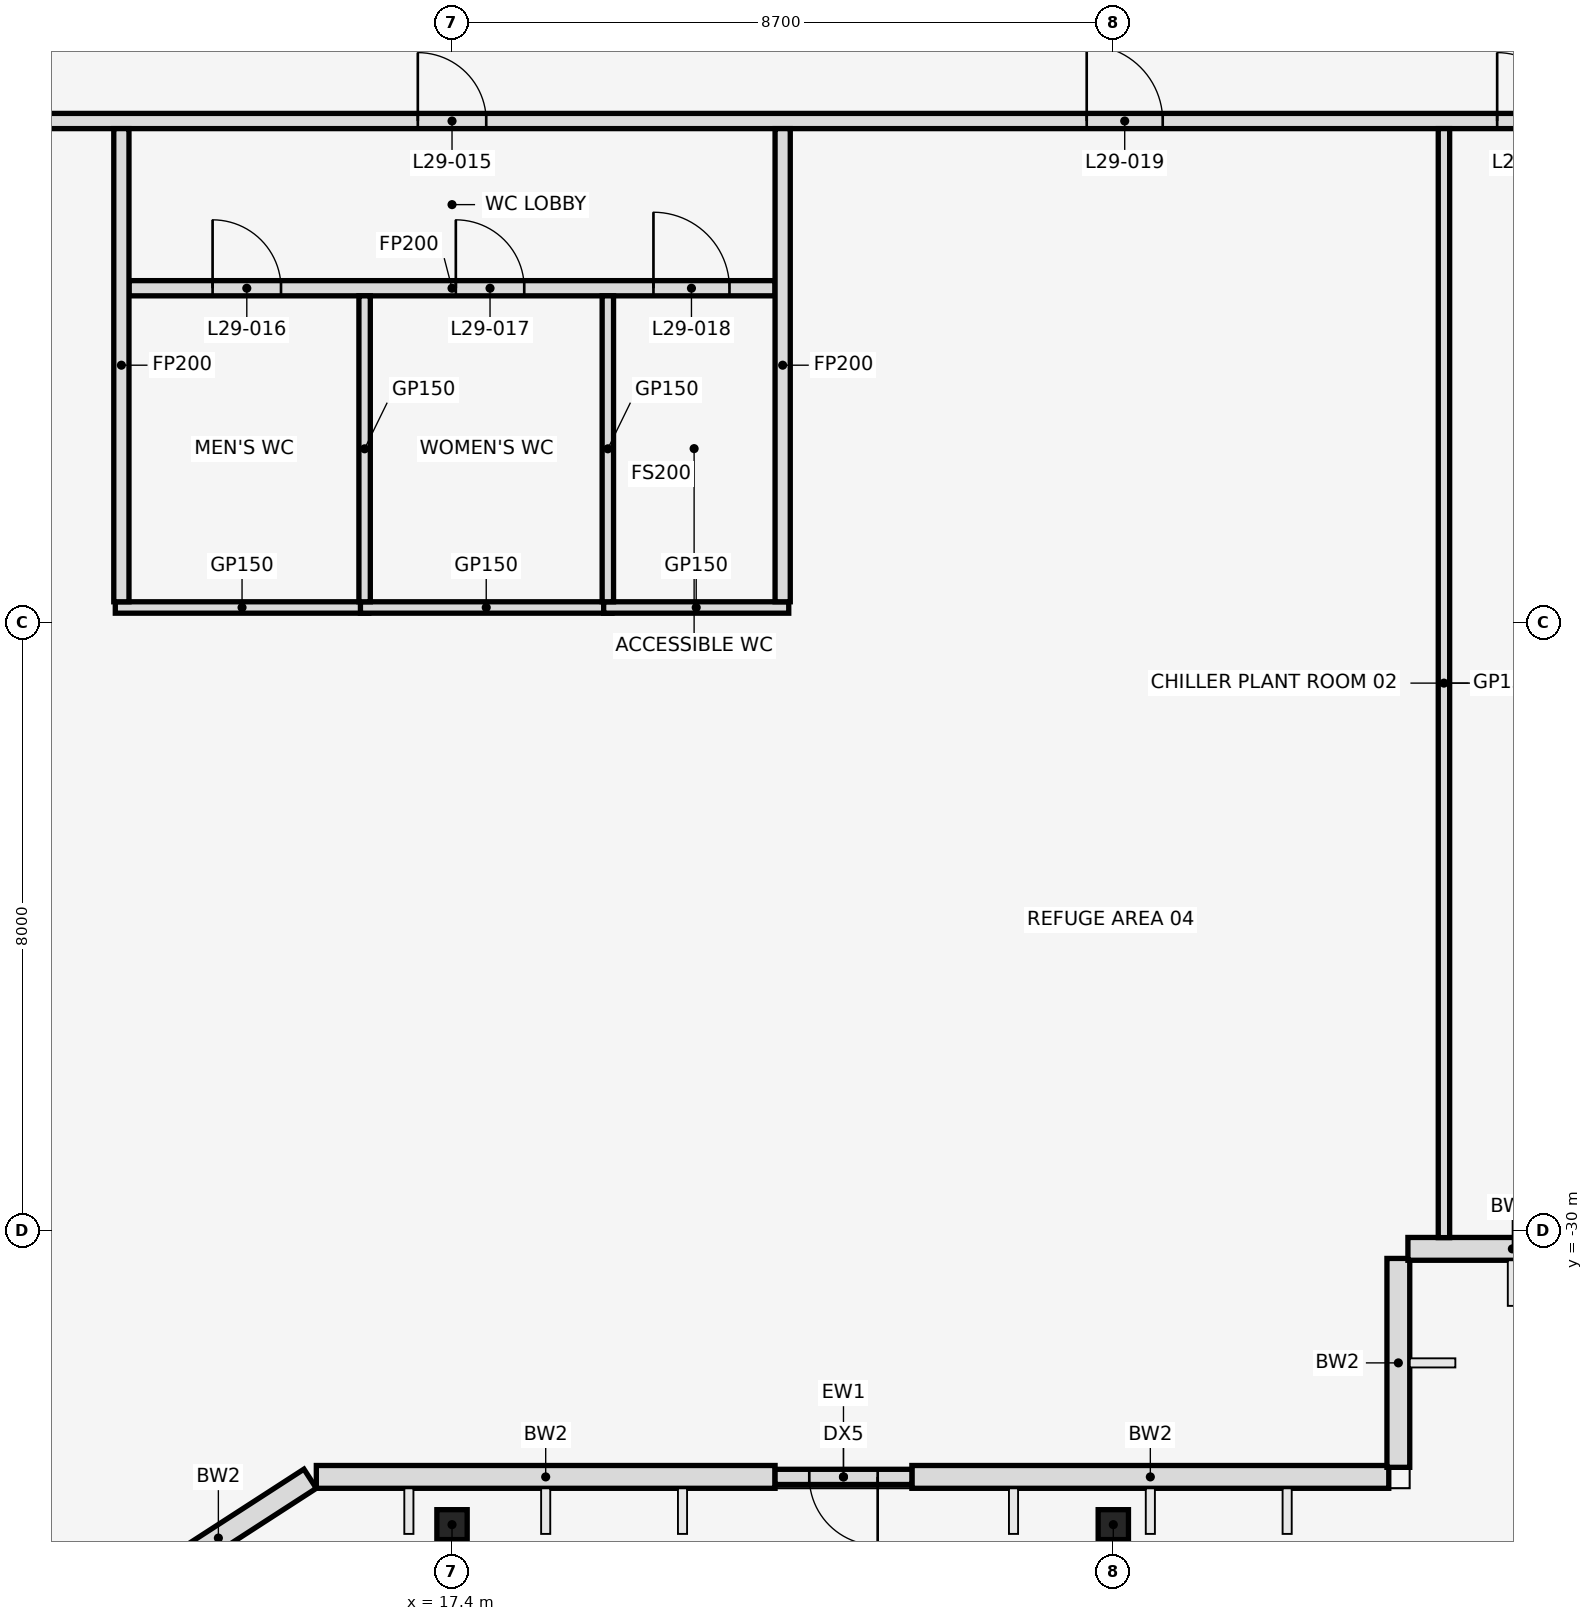
"""IFC4 building model, lengths in metres.
Left out: names, types, materials, properties, quantities, classifications, styles, units other than length and angle.
Written with IfcOpenShell. Run it as: python <this file> out.ifc"""

import sys

from ifc_helpers import new_model, si_unit, direction, frame, frame_2d, origin, origin_2d, place, context, subcontext, project, spatial, rectangle, i_section, extrude, element, fill, save


model = new_model("IFC4")
c1 = context("Model", 3, precision=1e-05, world=origin(), true_north=direction((0.0, 1.0)))
c2 = subcontext(c1, "Body", "Model", "MODEL_VIEW")
j1 = project(units=[si_unit("LENGTHUNIT", "METRE"), si_unit("PLANEANGLEUNIT", "RADIAN")], contexts=[c1])
p1 = place(None, origin())
s1 = spatial("IfcSite", under=j1, at=p1, CompositionType="ELEMENT")
p2 = place(p1, origin())
s2 = spatial("IfcBuilding", under=s1, at=p2, CompositionType="ELEMENT")
p3 = place(p2, frame((0.0, 0.0, 135.0)))
s3 = spatial("IfcBuildingStorey", under=s2, at=p3, CompositionType="ELEMENT", Elevation=135.0)
for number, where, z_axis, x_axis in (
    (1, (17.4, -33.866, 0.0), (0.0, 0.0, 1.0), (1.0, 0.0, 0.0)),
    (2, (26.1, -33.866, 0.0), (0.0, 0.0, 1.0), (1.0, 0.0, 0.0)),
):
    element("IfcColumn", number, at=place(p3, frame(where, z_axis=z_axis, x_axis=x_axis)), inside=s3, PredefinedType="COLUMN", context=c2, shape_type="SweptSolid", body=[
        extrude(i_section(OverallWidth=0.399, OverallDepth=0.394, WebThickness=0.023, FlangeThickness=0.037, at=origin_2d()), origin(), (0.0, 0.0, 1.0), 5.4),
    ])
p4 = place(p3, frame((13.119, -34.823, 0.0), z_axis=(0.0, 0.0, 1.0), x_axis=(0.839779682339, 0.542927329512, 0.0)))
e3 = element("IfcWall", 3, at=p4, inside=s3, PredefinedType="STANDARD", context=c2, shape_type="SweptSolid", body=[
    extrude(rectangle(XDim=2.875, YDim=0.3, at=frame_2d((1.438, 0.0))), origin(), (0.0, 0.0, 1.0), 4.26),
])
p5 = place(p3, frame((15.615, -33.238, 0.0), z_axis=(0.0, 0.0, 1.0), x_axis=(1.0, 0.0, 0.0)))
e4 = element("IfcWall", 4, at=p5, inside=s3, PredefinedType="STANDARD", context=c2, shape_type="SweptSolid", body=[
    extrude(rectangle(XDim=6.035, YDim=0.3, at=frame_2d((3.018, 0.0))), origin(), (0.0, 0.0, 1.0), 4.28),
])
p6 = place(p3, frame((23.45, -33.238, 0.0), z_axis=(0.0, 0.0, 1.0), x_axis=(1.0, 0.0, 0.0)))
e5 = element("IfcWall", 5, at=p6, inside=s3, PredefinedType="STANDARD", context=c2, shape_type="SweptSolid", body=[
    extrude(rectangle(XDim=6.274, YDim=0.3, at=frame_2d((3.137, 0.0))), origin(), (0.0, 0.0, 1.0), 4.28),
])
p7 = place(p3, frame((29.85, -33.112, 0.0), z_axis=(0.0, 0.0, 1.0), x_axis=(0.0, 1.0, 0.0)))
e6 = element("IfcWall", 6, at=p7, inside=s3, PredefinedType="STANDARD", context=c2, shape_type="SweptSolid", body=[
    extrude(rectangle(XDim=2.748, YDim=0.3, at=frame_2d((1.374, 0.0))), origin(), (0.0, 0.0, 1.0), 4.28),
])
p8 = place(p3, frame((29.976, -30.238, 0.0), z_axis=(0.0, 0.0, 1.0), x_axis=(1.0, 0.0, 0.0)))
e7 = element("IfcWall", 7, at=p8, inside=s3, PredefinedType="STANDARD", context=c2, shape_type="SweptSolid", body=[
    extrude(rectangle(XDim=2.748, YDim=0.3, at=frame_2d((1.374, 0.0))), origin(), (0.0, 0.0, 1.0), 4.28),
])
p9 = place(p3, frame((23.45, -33.238, 0.0), z_axis=(0.0, 0.0, 1.0), x_axis=(-1.0, 0.0, 0.0)))
e8 = element("IfcWall", 8, at=p9, inside=s3, PredefinedType="STANDARD", context=c2, shape_type="SweptSolid", body=[
    extrude(rectangle(XDim=1.8, YDim=0.2, at=frame_2d((0.9, 0.0))), origin(), (0.0, 0.0, 1.0), 5.25),
])
p10 = place(p9, frame((0.45, 0.0, 0.0)))
e9 = element("IfcOpeningElement", 9, at=p10, cuts=e8, PredefinedType="OPENING", context=c2, shape_type="SweptSolid", body=[
    extrude(rectangle(XDim=0.9, YDim=2.1, at=frame_2d((0.45, 1.05))), frame((0.0, 0.112, 0.0), z_axis=(0.0, -1.0, 0.0), x_axis=(1.0, 0.0, 0.0)), (0.0, 0.0, 1.0), 0.224),
])
p11 = place(p3, frame((12.97, -21.8, 0.0), z_axis=(0.0, 0.0, 1.0), x_axis=(1.0, 0.0, 0.0)))
e10 = element("IfcWall", 10, at=p11, inside=s3, PredefinedType="PARTITIONING", context=c2, shape_type="SweptSolid", body=[
    extrude(rectangle(XDim=3.335, YDim=0.15, at=frame_2d((1.667, 0.0))), origin(), (0.0, 0.0, 1.0), 4.24),
])
p12 = place(p3, frame((16.195, -21.8, 0.0), z_axis=(0.0, 0.0, 1.0), x_axis=(1.0, 0.0, 0.0)))
e11 = element("IfcWall", 11, at=p12, inside=s3, PredefinedType="PARTITIONING", context=c2, shape_type="SweptSolid", body=[
    extrude(rectangle(XDim=3.31, YDim=0.15, at=frame_2d((1.655, 0.0))), origin(), (0.0, 0.0, 1.0), 4.24),
])
p13 = place(p3, frame((19.395, -21.8, 0.0), z_axis=(0.0, 0.0, 1.0), x_axis=(1.0, 0.0, 0.0)))
e12 = element("IfcWall", 12, at=p13, inside=s3, PredefinedType="PARTITIONING", context=c2, shape_type="SweptSolid", body=[
    extrude(rectangle(XDim=2.435, YDim=0.15, at=frame_2d((1.218, 0.0))), origin(), (0.0, 0.0, 1.0), 4.24),
])
p14 = place(p3, frame((13.15, -17.6, 0.0), z_axis=(0.0, 0.0, 1.0), x_axis=(1.0, 0.0, 0.0)))
e13 = element("IfcWall", 13, at=p14, inside=s3, PredefinedType="PARTITIONING", context=c2, shape_type="SweptSolid", body=[
    extrude(rectangle(XDim=8.5, YDim=0.2, at=frame_2d((4.25, 0.0))), origin(), (0.0, 0.0, 1.0), 4.24),
])
p15 = place(p14, frame((1.1, 0.0, 0.0)))
e14 = element("IfcOpeningElement", 14, at=p15, cuts=e13, PredefinedType="OPENING", context=c2, shape_type="SweptSolid", body=[
    extrude(rectangle(XDim=0.9, YDim=2.1, at=frame_2d((0.45, 1.05))), frame((0.0, 0.112, 0.0), z_axis=(0.0, -1.0, 0.0), x_axis=(1.0, 0.0, 0.0)), (0.0, 0.0, 1.0), 0.224),
])
p16 = place(p14, frame((4.3, 0.0, 0.0)))
e15 = element("IfcOpeningElement", 15, at=p16, cuts=e13, PredefinedType="OPENING", context=c2, shape_type="SweptSolid", body=[
    extrude(rectangle(XDim=0.9, YDim=2.1, at=frame_2d((0.45, 1.05))), frame((0.0, 0.112, 0.0), z_axis=(0.0, -1.0, 0.0), x_axis=(1.0, 0.0, 0.0)), (0.0, 0.0, 1.0), 0.224),
])
p17 = place(p14, frame((6.9, 0.0, 0.0)))
e16 = element("IfcOpeningElement", 16, at=p17, cuts=e13, PredefinedType="OPENING", context=c2, shape_type="SweptSolid", body=[
    extrude(rectangle(XDim=1.0, YDim=2.1, at=frame_2d((0.5, 1.05))), frame((0.0, 0.112, 0.0), z_axis=(0.0, -1.0, 0.0), x_axis=(1.0, 0.0, 0.0)), (0.0, 0.0, 1.0), 0.224),
])
p18 = place(p3, frame((-32.7, -15.4, 0.0), z_axis=(0.0, 0.0, 1.0), x_axis=(1.0, 0.0, 0.0)))
e17 = element("IfcWall", 17, at=p18, inside=s3, PredefinedType="PARTITIONING", context=c2, shape_type="SweptSolid", body=[
    extrude(rectangle(XDim=65.4, YDim=0.2, at=frame_2d((32.7, 0.0))), origin(), (0.0, 0.0, 1.0), 4.24),
])
p19 = place(p18, frame((0.7, 0.0, 0.0)))
e18 = element("IfcOpeningElement", 18, at=p19, cuts=e17, PredefinedType="OPENING", context=c2, shape_type="SweptSolid", body=[
    extrude(rectangle(XDim=0.9, YDim=2.1, at=frame_2d((0.45, 1.05))), frame((0.0, 0.112, 0.0), z_axis=(0.0, -1.0, 0.0), x_axis=(1.0, 0.0, 0.0)), (0.0, 0.0, 1.0), 0.224),
])
p20 = place(p18, frame((5.95, 0.0, 0.0)))
e19 = element("IfcOpeningElement", 19, at=p20, cuts=e17, PredefinedType="OPENING", context=c2, shape_type="SweptSolid", body=[
    extrude(rectangle(XDim=1.0, YDim=2.1, at=frame_2d((0.5, 1.05))), frame((0.0, 0.112, 0.0), z_axis=(0.0, -1.0, 0.0), x_axis=(1.0, 0.0, 0.0)), (0.0, 0.0, 1.0), 0.224),
])
p21 = place(p18, frame((14.85, 0.0, 0.0)))
e20 = element("IfcOpeningElement", 20, at=p21, cuts=e17, PredefinedType="OPENING", context=c2, shape_type="SweptSolid", body=[
    extrude(rectangle(XDim=1.0, YDim=2.1, at=frame_2d((0.5, 1.05))), frame((0.0, 0.112, 0.0), z_axis=(0.0, -1.0, 0.0), x_axis=(1.0, 0.0, 0.0)), (0.0, 0.0, 1.0), 0.224),
])
p22 = place(p18, frame((23.55, 0.0, 0.0)))
e21 = element("IfcOpeningElement", 21, at=p22, cuts=e17, PredefinedType="OPENING", context=c2, shape_type="SweptSolid", body=[
    extrude(rectangle(XDim=1.0, YDim=2.1, at=frame_2d((0.5, 1.05))), frame((0.0, 0.112, 0.0), z_axis=(0.0, -1.0, 0.0), x_axis=(1.0, 0.0, 0.0)), (0.0, 0.0, 1.0), 0.224),
])
p23 = place(p18, frame((34.4, 0.0, 0.0)))
e22 = element("IfcOpeningElement", 22, at=p23, cuts=e17, PredefinedType="OPENING", context=c2, shape_type="SweptSolid", body=[
    extrude(rectangle(XDim=1.0, YDim=2.1, at=frame_2d((0.5, 1.05))), frame((0.0, 0.112, 0.0), z_axis=(0.0, -1.0, 0.0), x_axis=(1.0, 0.0, 0.0)), (0.0, 0.0, 1.0), 0.224),
])
p24 = place(p18, frame((40.95, 0.0, 0.0)))
e23 = element("IfcOpeningElement", 23, at=p24, cuts=e17, PredefinedType="OPENING", context=c2, shape_type="SweptSolid", body=[
    extrude(rectangle(XDim=1.0, YDim=2.1, at=frame_2d((0.5, 1.05))), frame((0.0, 0.112, 0.0), z_axis=(0.0, -1.0, 0.0), x_axis=(1.0, 0.0, 0.0)), (0.0, 0.0, 1.0), 0.224),
])
p25 = place(p18, frame((49.65, 0.0, 0.0)))
e24 = element("IfcOpeningElement", 24, at=p25, cuts=e17, PredefinedType="OPENING", context=c2, shape_type="SweptSolid", body=[
    extrude(rectangle(XDim=0.9, YDim=2.1, at=frame_2d((0.45, 1.05))), frame((0.0, 0.112, 0.0), z_axis=(0.0, -1.0, 0.0), x_axis=(1.0, 0.0, 0.0)), (0.0, 0.0, 1.0), 0.224),
])
p26 = place(p18, frame((58.45, 0.0, 0.0)))
e25 = element("IfcOpeningElement", 25, at=p26, cuts=e17, PredefinedType="OPENING", context=c2, shape_type="SweptSolid", body=[
    extrude(rectangle(XDim=1.0, YDim=2.1, at=frame_2d((0.5, 1.05))), frame((0.0, 0.112, 0.0), z_axis=(0.0, -1.0, 0.0), x_axis=(1.0, 0.0, 0.0)), (0.0, 0.0, 1.0), 0.224),
])
p27 = place(p18, frame((63.85, 0.0, 0.0)))
e26 = element("IfcOpeningElement", 26, at=p27, cuts=e17, PredefinedType="OPENING", context=c2, shape_type="SweptSolid", body=[
    extrude(rectangle(XDim=0.9, YDim=2.1, at=frame_2d((0.45, 1.05))), frame((0.0, 0.112, 0.0), z_axis=(0.0, -1.0, 0.0), x_axis=(1.0, 0.0, 0.0)), (0.0, 0.0, 1.0), 0.224),
])
p28 = place(p3, frame((13.05, -21.725, 0.0), z_axis=(0.0, 0.0, 1.0), x_axis=(0.0, 1.0, 0.0)))
e27 = element("IfcWall", 27, at=p28, inside=s3, PredefinedType="PARTITIONING", context=c2, shape_type="SweptSolid", body=[
    extrude(rectangle(XDim=6.225, YDim=0.2, at=frame_2d((3.113, 0.0))), origin(), (0.0, 0.0, 1.0), 4.24),
])
for number, where, z_axis, x_axis in (
    (28, (16.25, -21.725, 0.0), (0.0, 0.0, 1.0), (0.0, 1.0, 0.0)),
    (29, (19.45, -21.725, 0.0), (0.0, 0.0, 1.0), (0.0, 1.0, 0.0)),
):
    element("IfcWall", number, at=place(p3, frame(where, z_axis=z_axis, x_axis=x_axis)), inside=s3, PredefinedType="PARTITIONING", context=c2, shape_type="SweptSolid", body=[
        extrude(rectangle(XDim=4.025, YDim=0.15, at=frame_2d((2.013, 0.0))), origin(), (0.0, 0.0, 1.0), 4.24),
    ])
p29 = place(p3, frame((21.75, -21.725, 0.0), z_axis=(0.0, 0.0, 1.0), x_axis=(0.0, 1.0, 0.0)))
e30 = element("IfcWall", 30, at=p29, inside=s3, PredefinedType="PARTITIONING", context=c2, shape_type="SweptSolid", body=[
    extrude(rectangle(XDim=6.225, YDim=0.2, at=frame_2d((3.113, 0.0))), origin(), (0.0, 0.0, 1.0), 4.24),
])
p30 = place(p3, frame((30.45, -30.09, 0.0), z_axis=(0.0, 0.0, 1.0), x_axis=(0.0, 1.0, 0.0)))
e31 = element("IfcWall", 31, at=p30, inside=s3, PredefinedType="PARTITIONING", context=c2, shape_type="SweptSolid", body=[
    extrude(rectangle(XDim=14.59, YDim=0.15, at=frame_2d((7.295, 0.0))), origin(), (0.0, 0.0, 1.0), 4.24),
])
p31 = place(p10, origin())
e32 = element("IfcDoor", 32, at=p31, inside=s3, OperationType="SINGLE_SWING_LEFT", PredefinedType="DOOR", context=c2, shape_type="SweptSolid", body=[
    extrude(rectangle(XDim=0.9, YDim=2.1, at=frame_2d((0.45, 1.05))), frame((0.0, 0.025, 0.0), z_axis=(0.0, -1.0, 0.0), x_axis=(1.0, 0.0, 0.0)), (0.0, 0.0, 1.0), 0.05),
])
fill(e9, e32)
p32 = place(p25, frame((0.9, 0.0, 0.0), z_axis=(0.0, 0.0, 1.0), x_axis=(-1.0, 0.0, 0.0)))
e33 = element("IfcDoor", 33, at=p32, inside=s3, OperationType="SINGLE_SWING_RIGHT", PredefinedType="DOOR", context=c2, shape_type="SweptSolid", body=[
    extrude(rectangle(XDim=0.9, YDim=2.1, at=frame_2d((0.45, 1.05))), frame((0.0, 0.025, 0.0), z_axis=(0.0, -1.0, 0.0), x_axis=(1.0, 0.0, 0.0)), (0.0, 0.0, 1.0), 0.05),
])
fill(e24, e33)
p33 = place(p15, frame((0.9, 0.0, 0.0), z_axis=(0.0, 0.0, 1.0), x_axis=(-1.0, 0.0, 0.0)))
e34 = element("IfcDoor", 34, at=p33, inside=s3, OperationType="SINGLE_SWING_LEFT", PredefinedType="DOOR", context=c2, shape_type="SweptSolid", body=[
    extrude(rectangle(XDim=0.9, YDim=2.1, at=frame_2d((0.45, 1.05))), frame((0.0, 0.025, 0.0), z_axis=(0.0, -1.0, 0.0), x_axis=(1.0, 0.0, 0.0)), (0.0, 0.0, 1.0), 0.05),
])
fill(e14, e34)
p34 = place(p16, frame((0.9, 0.0, 0.0), z_axis=(0.0, 0.0, 1.0), x_axis=(-1.0, 0.0, 0.0)))
e35 = element("IfcDoor", 35, at=p34, inside=s3, OperationType="SINGLE_SWING_RIGHT", PredefinedType="DOOR", context=c2, shape_type="SweptSolid", body=[
    extrude(rectangle(XDim=0.9, YDim=2.1, at=frame_2d((0.45, 1.05))), frame((0.0, 0.025, 0.0), z_axis=(0.0, -1.0, 0.0), x_axis=(1.0, 0.0, 0.0)), (0.0, 0.0, 1.0), 0.05),
])
fill(e15, e35)
p35 = place(p17, frame((1.0, 0.0, 0.0), z_axis=(0.0, 0.0, 1.0), x_axis=(-1.0, 0.0, 0.0)))
e36 = element("IfcDoor", 36, at=p35, inside=s3, OperationType="SINGLE_SWING_RIGHT", PredefinedType="DOOR", context=c2, shape_type="SweptSolid", body=[
    extrude(rectangle(XDim=1.0, YDim=2.1, at=frame_2d((0.5, 1.05))), frame((0.0, 0.025, 0.0), z_axis=(0.0, -1.0, 0.0), x_axis=(1.0, 0.0, 0.0)), (0.0, 0.0, 1.0), 0.05),
])
fill(e16, e36)
p36 = place(p26, frame((1.0, 0.0, 0.0), z_axis=(0.0, 0.0, 1.0), x_axis=(-1.0, 0.0, 0.0)))
e37 = element("IfcDoor", 37, at=p36, inside=s3, OperationType="SINGLE_SWING_LEFT", PredefinedType="DOOR", context=c2, shape_type="SweptSolid", body=[
    extrude(rectangle(XDim=1.0, YDim=2.1, at=frame_2d((0.5, 1.05))), frame((0.0, 0.025, 0.0), z_axis=(0.0, -1.0, 0.0), x_axis=(1.0, 0.0, 0.0)), (0.0, 0.0, 1.0), 0.05),
])
fill(e25, e37)
p37 = place(p27, frame((0.9, 0.0, 0.0), z_axis=(0.0, 0.0, 1.0), x_axis=(-1.0, 0.0, 0.0)))
e38 = element("IfcDoor", 38, at=p37, inside=s3, OperationType="SINGLE_SWING_RIGHT", PredefinedType="DOOR", context=c2, shape_type="SweptSolid", body=[
    extrude(rectangle(XDim=0.9, YDim=2.1, at=frame_2d((0.45, 1.05))), frame((0.0, 0.025, 0.0), z_axis=(0.0, -1.0, 0.0), x_axis=(1.0, 0.0, 0.0)), (0.0, 0.0, 1.0), 0.05),
])
fill(e26, e38)
save(model, sys.argv[1])
